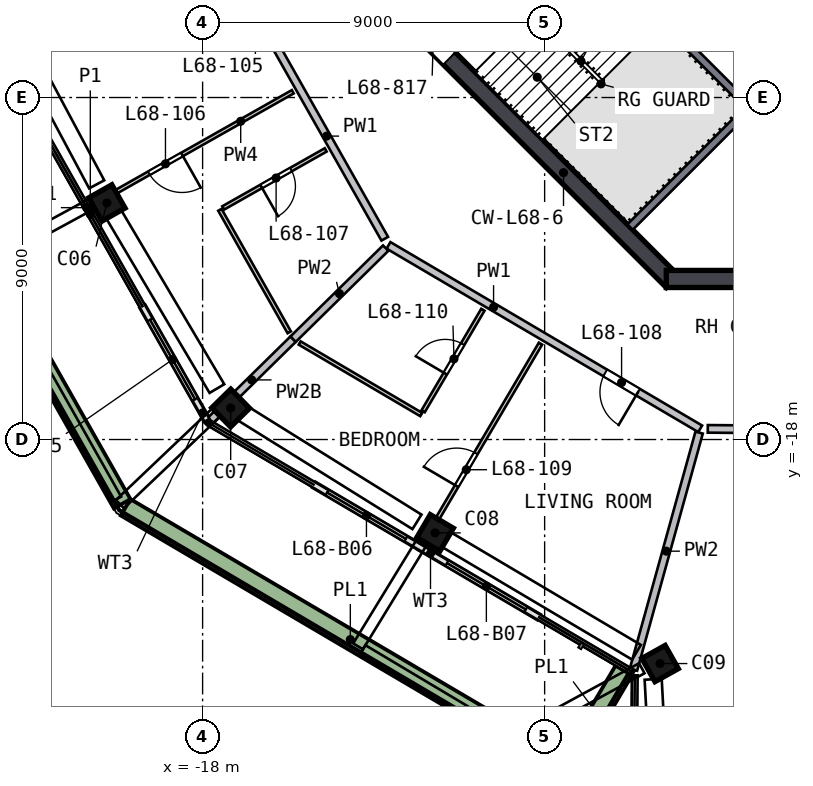
"""IFC4 building model, lengths in metres.
Left out: names, types, materials, properties, quantities, classifications, styles, units other than length and angle.
Written with IfcOpenShell. Run it as: python <this file> out.ifc"""

import sys

from ifc_helpers import new_model, si_unit, direction, frame, frame_2d, origin, origin_2d, place, context, subcontext, project, spatial, rectangle, extrude, element, fill, save


model = new_model("IFC4")
c1 = context("Model", 3, precision=1e-05, world=origin(), true_north=direction((0.0, 1.0)))
c2 = subcontext(c1, "Body", "Model", "MODEL_VIEW")
j1 = project(units=[si_unit("LENGTHUNIT", "METRE"), si_unit("PLANEANGLEUNIT", "RADIAN")], contexts=[c1])
p1 = place(None, origin())
s1 = spatial("IfcSite", under=j1, at=p1, CompositionType="ELEMENT")
p2 = place(p1, origin())
s2 = spatial("IfcBuilding", under=s1, at=p2, CompositionType="ELEMENT")
p3 = place(p2, frame((0.0, 0.0, 277.5)))
s3 = spatial("IfcBuildingStorey", under=s2, at=p3, CompositionType="ELEMENT", Elevation=277.5)
p4 = place(p3, frame((-20.587, -11.657, 0.0), z_axis=(0.056275557, -0.097493601, 0.993643829), x_axis=(0.4894198, -0.864752693, -0.112565713)))
e1 = element("IfcColumn", 1, at=p4, inside=s3, PredefinedType="COLUMN", context=c2, shape_type="SweptSolid", body=[
    extrude(rectangle(XDim=0.7, YDim=0.7, at=origin_2d()), origin(), (0.0, 0.0, 1.0), 3.21),
])
p5 = place(p3, frame((-17.36, -17.072, 0.0), z_axis=(0.081797768, -0.081873788, 0.993280327), x_axis=(-0.696037958, 0.708616908, 0.115729164)))
e2 = element("IfcColumn", 2, at=p5, inside=s3, PredefinedType="COLUMN", context=c2, shape_type="SweptSolid", body=[
    extrude(rectangle(XDim=0.7, YDim=0.7, at=origin_2d()), origin(), (0.0, 0.0, 1.0), 3.211),
])
p6 = place(p3, frame((-12.0, -20.389, 0.0), z_axis=(0.097493601, -0.056275557, 0.993643829), x_axis=(0.8563225, -0.504024539, -0.112565713)))
e3 = element("IfcColumn", 3, at=p6, inside=s3, PredefinedType="COLUMN", context=c2, shape_type="SweptSolid", body=[
    extrude(rectangle(XDim=0.7, YDim=0.7, at=origin_2d()), origin(), (0.0, 0.0, 1.0), 3.21),
])
p7 = place(p3, frame((-6.1, -23.862, 0.0), z_axis=(0.113632685, -0.028047131, 0.993126866), x_axis=(-0.485091763, 0.870787363, 0.080095877)))
e4 = element("IfcColumn", 4, at=p7, inside=s3, PredefinedType="COLUMN", context=c2, shape_type="SweptSolid", body=[
    extrude(rectangle(XDim=0.7, YDim=0.7, at=origin_2d()), origin(), (0.0, 0.0, 1.0), 3.212),
])
p8 = place(p3, frame((-13.841, -5.64, 0.0), z_axis=(0.0, 0.0, 1.0), x_axis=(0.707106781, -0.707106781, 0.0)))
e5 = element("IfcWall", 5, at=p8, inside=s3, PredefinedType="SHEAR", context=c2, shape_type="SweptSolid", body=[
    extrude(rectangle(XDim=11.598, YDim=0.45, at=frame_2d((5.799, 0.0))), origin(), (0.0, 0.0, 1.0), 3.5),
])
p9 = place(p8, frame((2.099, 0.0, 0.0)))
e6 = element("IfcOpeningElement", 6, at=p9, cuts=e5, PredefinedType="OPENING", context=c2, shape_type="SweptSolid", body=[
    extrude(rectangle(XDim=1.2, YDim=2.1, at=frame_2d((0.6, 1.05))), frame((0.0, 0.235, 0.0), z_axis=(0.0, -1.0, 0.0), x_axis=(1.0, 0.0, 0.0)), (0.0, 0.0, 1.0), 0.47),
])
p10 = place(p3, frame((-5.799, -13.775, 0.0), z_axis=(0.0, 0.0, 1.0), x_axis=(1.0, 0.0, 0.0)))
e7 = element("IfcWall", 7, at=p10, inside=s3, PredefinedType="SHEAR", context=c2, shape_type="SweptSolid", body=[
    extrude(rectangle(XDim=11.598, YDim=0.45, at=frame_2d((5.799, 0.0))), origin(), (0.0, 0.0, 1.0), 3.5),
])
p11 = place(p3, frame((-19.579, -14.503, 0.0), z_axis=(0.0, 0.0, 1.0), x_axis=(0.492728526, -0.870183084, 0.0)))
e8 = element("IfcWall", 8, at=p11, inside=s3, PredefinedType="SOLIDWALL", context=c2, shape_type="SweptSolid", body=[
    extrude(rectangle(XDim=3.427, YDim=0.15, at=frame_2d((1.713, 0.0))), origin(), (0.0, 0.0, 1.0), 2.525),
])
p12 = place(p11, frame((0.4, 0.0, 0.0)))
e9 = element("IfcOpeningElement", 9, at=p12, cuts=e8, PredefinedType="OPENING", context=c2, shape_type="SweptSolid", body=[
    extrude(rectangle(XDim=2.4, YDim=2.4, at=frame_2d((1.2, 1.2))), frame((0.0, 0.085, 0.0), z_axis=(0.0, -1.0, 0.0), x_axis=(1.0, 0.0, 0.0)), (0.0, 0.0, 1.0), 0.17),
])
p13 = place(p3, frame((-15.068, -19.193, 0.0), z_axis=(0.0, 0.0, 1.0), x_axis=(0.86182992, -0.507197387, 0.0)))
e10 = element("IfcWall", 10, at=p13, inside=s3, PredefinedType="SOLIDWALL", context=c2, shape_type="SweptSolid", body=[
    extrude(rectangle(XDim=3.25, YDim=0.15, at=frame_2d((1.625, 0.0))), origin(), (0.0, 0.0, 1.0), 2.525),
])
p14 = place(p13, frame((0.4, 0.0, 0.0)))
e11 = element("IfcOpeningElement", 11, at=p14, cuts=e10, PredefinedType="OPENING", context=c2, shape_type="SweptSolid", body=[
    extrude(rectangle(XDim=2.4, YDim=2.4, at=frame_2d((1.2, 1.2))), frame((0.0, 0.085, 0.0), z_axis=(0.0, -1.0, 0.0), x_axis=(1.0, 0.0, 0.0)), (0.0, 0.0, 1.0), 0.17),
])
p15 = place(p3, frame((-12.267, -20.841, 0.0), z_axis=(0.0, 0.0, 1.0), x_axis=(0.861793405, -0.507259427, 0.0)))
e12 = element("IfcWall", 12, at=p15, inside=s3, PredefinedType="SOLIDWALL", context=c2, shape_type="SweptSolid", body=[
    extrude(rectangle(XDim=3.611, YDim=0.15, at=frame_2d((1.806, 0.0))), origin(), (0.0, 0.0, 1.0), 2.525),
])
p16 = place(p15, frame((0.811, 0.0, 0.0)))
e13 = element("IfcOpeningElement", 13, at=p16, cuts=e12, PredefinedType="OPENING", context=c2, shape_type="SweptSolid", body=[
    extrude(rectangle(XDim=2.4, YDim=2.4, at=frame_2d((1.2, 1.2))), frame((0.0, 0.085, 0.0), z_axis=(0.0, -1.0, 0.0), x_axis=(1.0, 0.0, 0.0)), (0.0, 0.0, 1.0), 0.17),
])
p17 = place(p3, frame((-26.633, -8.185, 0.0), z_axis=(0.0, 0.0, 1.0), x_axis=(0.492731181, -0.870181581, 0.0)))
e14 = element("IfcWall", 14, at=p17, inside=s3, PredefinedType="SOLIDWALL", context=c2, shape_type="SweptSolid", body=[
    extrude(rectangle(XDim=13.223, YDim=0.5, at=frame_2d((6.612, 0.0))), origin(), (0.0, 0.0, 1.0), 0.7),
])
p18 = place(p3, frame((-20.026, -19.784, 0.0), z_axis=(0.0, 0.0, 1.0), x_axis=(0.861801103, -0.507246349, 0.0)))
e15 = element("IfcWall", 15, at=p18, inside=s3, PredefinedType="SOLIDWALL", context=c2, shape_type="SweptSolid", body=[
    extrude(rectangle(XDim=13.723, YDim=0.5, at=frame_2d((6.862, 0.0))), origin(), (0.0, 0.0, 1.0), 0.7),
])
p19 = place(p3, frame((-8.288, -26.403, 0.0), z_axis=(0.0, 0.0, 1.0), x_axis=(0.507281009, 0.861780702, 0.0)))
e16 = element("IfcWall", 16, at=p19, inside=s3, PredefinedType="SOLIDWALL", context=c2, shape_type="SweptSolid", body=[
    extrude(rectangle(XDim=2.699, YDim=0.5, at=frame_2d((1.35, 0.0))), origin(), (0.0, 0.0, 1.0), 0.7),
])
p20 = place(p3, frame((-3.535, -9.334, 0.0), z_axis=(0.0, 0.0, 1.0), x_axis=(-0.707120946, 0.707092617, 0.0)))
e17 = element("IfcWall", 17, at=p20, inside=s3, PredefinedType="SOLIDWALL", context=c2, shape_type="SweptSolid", body=[
    extrude(rectangle(XDim=8.618, YDim=0.2, at=frame_2d((4.309, 0.0))), origin(), (0.0, 0.0, 1.0), 3.19),
])
p21 = place(p20, frame((6.6, 0.0, 0.0)))
e18 = element("IfcOpeningElement", 18, at=p21, cuts=e17, PredefinedType="OPENING", context=c2, shape_type="SweptSolid", body=[
    extrude(rectangle(XDim=1.2, YDim=2.1, at=frame_2d((0.6, 1.05))), frame((0.0, 0.11, 0.0), z_axis=(0.0, -1.0, 0.0), x_axis=(1.0, 0.0, 0.0)), (0.0, 0.0, 1.0), 0.22),
])
p22 = place(p3, frame((-3.677, -9.334, 0.0), z_axis=(0.0, 0.0, 1.0), x_axis=(-0.707106781, -0.707106781, 0.0)))
e19 = element("IfcWall", 19, at=p22, inside=s3, PredefinedType="SOLIDWALL", context=c2, shape_type="SweptSolid", body=[
    extrude(rectangle(XDim=4.35, YDim=0.2, at=frame_2d((2.175, 0.0))), origin(), (0.0, 0.0, 1.0), 3.19),
])
p23 = place(p3, frame((-13.207, -12.717, 0.0), z_axis=(0.0, 0.0, 1.0), x_axis=(-0.492724884, 0.870185146, 0.0)))
e20 = element("IfcWall", 20, at=p23, inside=s3, PredefinedType="SOLIDWALL", context=c2, shape_type="SweptSolid", body=[
    extrude(rectangle(XDim=9.336, YDim=0.2, at=frame_2d((4.668, 0.0))), origin(), (0.0, 0.0, 1.0), 3.19),
])
p24 = place(p23, frame((6.408, 0.0, 0.0)))
e21 = element("IfcOpeningElement", 21, at=p24, cuts=e20, PredefinedType="OPENING", context=c2, shape_type="SweptSolid", body=[
    extrude(rectangle(XDim=1.0, YDim=2.1, at=frame_2d((0.5, 1.05))), frame((0.0, 0.11, 0.0), z_axis=(0.0, -1.0, 0.0), x_axis=(1.0, 0.0, 0.0)), (0.0, 0.0, 1.0), 0.22),
])
p25 = place(p3, frame((-4.907, -17.718, 0.0), z_axis=(0.0, 0.0, 1.0), x_axis=(-0.861806246, 0.507237612, 0.0)))
e22 = element("IfcWall", 22, at=p25, inside=s3, PredefinedType="SOLIDWALL", context=c2, shape_type="SweptSolid", body=[
    extrude(rectangle(XDim=9.517, YDim=0.2, at=frame_2d((4.758, 0.0))), origin(), (0.0, 0.0, 1.0), 3.19),
])
p26 = place(p25, frame((1.9, 0.0, 0.0)))
e23 = element("IfcOpeningElement", 23, at=p26, cuts=e22, PredefinedType="OPENING", context=c2, shape_type="SweptSolid", body=[
    extrude(rectangle(XDim=1.0, YDim=2.1, at=frame_2d((0.5, 1.05))), frame((0.0, 0.11, 0.0), z_axis=(0.0, -1.0, 0.0), x_axis=(1.0, 0.0, 0.0)), (0.0, 0.0, 1.0), 0.22),
])
p27 = place(p3, frame((4.609, -17.798, 0.0), z_axis=(0.0, 0.0, 1.0), x_axis=(-0.99996484, 0.008385669, 0.0)))
e24 = element("IfcWall", 24, at=p27, inside=s3, PredefinedType="SOLIDWALL", context=c2, shape_type="SweptSolid", body=[
    extrude(rectangle(XDim=9.316, YDim=0.2, at=frame_2d((4.658, 0.0))), origin(), (0.0, 0.0, 1.0), 3.19),
])
p28 = place(p27, frame((3.84, 0.0, 0.0)))
e25 = element("IfcOpeningElement", 25, at=p28, cuts=e24, PredefinedType="OPENING", context=c2, shape_type="SweptSolid", body=[
    extrude(rectangle(XDim=1.8, YDim=2.1, at=frame_2d((0.9, 1.05))), frame((0.0, 0.11, 0.0), z_axis=(0.0, -1.0, 0.0), x_axis=(1.0, 0.0, 0.0)), (0.0, 0.0, 1.0), 0.22),
])
p29 = place(p3, frame((-15.618, -15.359, 0.0), z_axis=(0.0, 0.0, 1.0), x_axis=(-0.71298711, -0.701177139, 0.0)))
e26 = element("IfcWall", 26, at=p29, inside=s3, PredefinedType="SOLIDWALL", context=c2, shape_type="SweptSolid", body=[
    extrude(rectangle(XDim=3.06, YDim=0.2, at=frame_2d((1.53, 0.0))), origin(), (0.0, 0.0, 1.0), 2.69),
])
p30 = place(p3, frame((-13.182, -12.963, 0.0), z_axis=(0.0, 0.0, 1.0), x_axis=(-0.71297783, -0.701186576, 0.0)))
e27 = element("IfcWall", 27, at=p30, inside=s3, PredefinedType="SOLIDWALL", context=c2, shape_type="SweptSolid", body=[
    extrude(rectangle(XDim=3.416, YDim=0.2, at=frame_2d((1.708, 0.0))), origin(), (0.0, 0.0, 1.0), 3.19),
])
p31 = place(p3, frame((-6.663, -24.059, 0.0), z_axis=(0.0, 0.0, 1.0), x_axis=(0.266914636, 0.963720176, 0.0)))
e28 = element("IfcWall", 28, at=p31, inside=s3, PredefinedType="SOLIDWALL", context=c2, shape_type="SweptSolid", body=[
    extrude(rectangle(XDim=6.476, YDim=0.2, at=frame_2d((3.238, 0.0))), origin(), (0.0, 0.0, 1.0), 3.19),
])
p32 = place(p3, frame((-15.627, -8.849, 0.0), z_axis=(0.0, 0.0, 1.0), x_axis=(-0.870190704, -0.492715069, 0.0)))
e29 = element("IfcWall", 29, at=p32, inside=s3, PredefinedType="PARTITIONING", context=c2, shape_type="SweptSolid", body=[
    extrude(rectangle(XDim=6.15, YDim=0.1, at=frame_2d((3.075, 0.0))), origin(), (0.0, 0.0, 1.0), 3.19),
])
p33 = place(p32, frame((3.35, 0.0, 0.0)))
e30 = element("IfcOpeningElement", 30, at=p33, cuts=e29, PredefinedType="OPENING", context=c2, shape_type="SweptSolid", body=[
    extrude(rectangle(XDim=1.0, YDim=2.1, at=frame_2d((0.5, 1.05))), frame((0.0, 0.06, 0.0), z_axis=(0.0, -1.0, 0.0), x_axis=(1.0, 0.0, 0.0)), (0.0, 0.0, 1.0), 0.12),
])
p34 = place(p3, frame((-17.545, -11.955, 0.0), z_axis=(0.0, 0.0, 1.0), x_axis=(0.492756443, -0.870167276, 0.0)))
e31 = element("IfcWall", 31, at=p34, inside=s3, PredefinedType="PARTITIONING", context=c2, shape_type="SweptSolid", body=[
    extrude(rectangle(XDim=3.704, YDim=0.1, at=frame_2d((1.852, 0.0))), origin(), (0.0, 0.0, 1.0), 3.19),
])
p35 = place(p3, frame((-14.761, -10.379, 0.0), z_axis=(0.0, 0.0, 1.0), x_axis=(-0.870194419, -0.492708506, 0.0)))
e32 = element("IfcWall", 32, at=p35, inside=s3, PredefinedType="PARTITIONING", context=c2, shape_type="SweptSolid", body=[
    extrude(rectangle(XDim=3.1, YDim=0.1, at=frame_2d((1.55, 0.0))), origin(), (0.0, 0.0, 1.0), 3.19),
])
p36 = place(p35, frame((1.05, 0.0, 0.0)))
e33 = element("IfcOpeningElement", 33, at=p36, cuts=e32, PredefinedType="OPENING", context=c2, shape_type="SweptSolid", body=[
    extrude(rectangle(XDim=0.9, YDim=2.1, at=frame_2d((0.45, 1.05))), frame((0.0, 0.06, 0.0), z_axis=(0.0, -1.0, 0.0), x_axis=(1.0, 0.0, 0.0)), (0.0, 0.0, 1.0), 0.12),
])
p37 = place(p3, frame((-15.446, -15.46, 0.0), z_axis=(0.0, 0.0, 1.0), x_axis=(0.861815808, -0.507221365, 0.0)))
e34 = element("IfcWall", 34, at=p37, inside=s3, PredefinedType="PARTITIONING", context=c2, shape_type="SweptSolid", body=[
    extrude(rectangle(XDim=3.711, YDim=0.1, at=frame_2d((1.855, 0.0))), origin(), (0.0, 0.0, 1.0), 3.19),
])
p38 = place(p3, frame((-12.197, -17.256, 0.0), z_axis=(0.0, 0.0, 1.0), x_axis=(0.5072507, 0.861798542, 0.0)))
e35 = element("IfcWall", 35, at=p38, inside=s3, PredefinedType="PARTITIONING", context=c2, shape_type="SweptSolid", body=[
    extrude(rectangle(XDim=3.1, YDim=0.1, at=frame_2d((1.55, 0.0))), origin(), (0.0, 0.0, 1.0), 3.19),
])
p39 = place(p38, frame((1.15, 0.0, 0.0)))
e36 = element("IfcOpeningElement", 36, at=p39, cuts=e35, PredefinedType="OPENING", context=c2, shape_type="SweptSolid", body=[
    extrude(rectangle(XDim=0.9, YDim=2.1, at=frame_2d((0.45, 1.05))), frame((0.0, 0.06, 0.0), z_axis=(0.0, -1.0, 0.0), x_axis=(1.0, 0.0, 0.0)), (0.0, 0.0, 1.0), 0.12),
])
p40 = place(p3, frame((-12.229, -20.777, 0.0), z_axis=(0.0, 0.0, 1.0), x_axis=(0.507256048, 0.861795394, 0.0)))
e37 = element("IfcWall", 37, at=p40, inside=s3, PredefinedType="PARTITIONING", context=c2, shape_type="SweptSolid", body=[
    extrude(rectangle(XDim=6.15, YDim=0.1, at=frame_2d((3.075, 0.0))), origin(), (0.0, 0.0, 1.0), 3.19),
])
p41 = place(p40, frame((1.8, 0.0, 0.0)))
e38 = element("IfcOpeningElement", 38, at=p41, cuts=e37, PredefinedType="OPENING", context=c2, shape_type="SweptSolid", body=[
    extrude(rectangle(XDim=1.0, YDim=2.1, at=frame_2d((0.5, 1.05))), frame((0.0, 0.06, 0.0), z_axis=(0.0, -1.0, 0.0), x_axis=(1.0, 0.0, 0.0)), (0.0, 0.0, 1.0), 0.12),
])
p42 = place(p12, origin())
e39 = element("IfcDoor", 39, at=p42, inside=s3, OperationType="SLIDING_TO_RIGHT", PredefinedType="DOOR", context=c2, shape_type="SweptSolid", body=[
    extrude(rectangle(XDim=2.4, YDim=2.4, at=frame_2d((1.2, 1.2))), frame((0.0, 0.025, 0.0), z_axis=(0.0, -1.0, 0.0), x_axis=(1.0, 0.0, 0.0)), (0.0, 0.0, 1.0), 0.05),
])
fill(e9, e39)
p43 = place(p14, origin())
e40 = element("IfcDoor", 40, at=p43, inside=s3, OperationType="SLIDING_TO_RIGHT", PredefinedType="DOOR", context=c2, shape_type="SweptSolid", body=[
    extrude(rectangle(XDim=2.4, YDim=2.4, at=frame_2d((1.2, 1.2))), frame((0.0, 0.025, 0.0), z_axis=(0.0, -1.0, 0.0), x_axis=(1.0, 0.0, 0.0)), (0.0, 0.0, 1.0), 0.05),
])
fill(e11, e40)
p44 = place(p16, origin())
e41 = element("IfcDoor", 41, at=p44, inside=s3, OperationType="SLIDING_TO_LEFT", PredefinedType="DOOR", context=c2, shape_type="SweptSolid", body=[
    extrude(rectangle(XDim=2.4, YDim=2.4, at=frame_2d((1.2, 1.2))), frame((0.0, 0.025, 0.0), z_axis=(0.0, -1.0, 0.0), x_axis=(1.0, 0.0, 0.0)), (0.0, 0.0, 1.0), 0.05),
])
fill(e13, e41)
p45 = place(p9, origin())
e42 = element("IfcDoor", 42, at=p45, inside=s3, OperationType="SINGLE_SWING_LEFT", PredefinedType="DOOR", context=c2, shape_type="SweptSolid", body=[
    extrude(rectangle(XDim=1.2, YDim=2.1, at=frame_2d((0.6, 1.05))), frame((0.0, 0.025, 0.0), z_axis=(0.0, -1.0, 0.0), x_axis=(1.0, 0.0, 0.0)), (0.0, 0.0, 1.0), 0.05),
])
fill(e6, e42)
p46 = place(p33, origin())
e43 = element("IfcDoor", 43, at=p46, inside=s3, OperationType="SINGLE_SWING_LEFT", PredefinedType="DOOR", context=c2, shape_type="SweptSolid", body=[
    extrude(rectangle(XDim=1.0, YDim=2.1, at=frame_2d((0.5, 1.05))), frame((0.0, 0.025, 0.0), z_axis=(0.0, -1.0, 0.0), x_axis=(1.0, 0.0, 0.0)), (0.0, 0.0, 1.0), 0.05),
])
fill(e30, e43)
p47 = place(p36, origin())
e44 = element("IfcDoor", 44, at=p47, inside=s3, OperationType="SINGLE_SWING_RIGHT", PredefinedType="DOOR", context=c2, shape_type="SweptSolid", body=[
    extrude(rectangle(XDim=0.9, YDim=2.1, at=frame_2d((0.45, 1.05))), frame((0.0, 0.025, 0.0), z_axis=(0.0, -1.0, 0.0), x_axis=(1.0, 0.0, 0.0)), (0.0, 0.0, 1.0), 0.05),
])
fill(e33, e44)
p48 = place(p26, origin())
e45 = element("IfcDoor", 45, at=p48, inside=s3, OperationType="SINGLE_SWING_LEFT", PredefinedType="DOOR", context=c2, shape_type="SweptSolid", body=[
    extrude(rectangle(XDim=1.0, YDim=2.1, at=frame_2d((0.5, 1.05))), frame((0.0, 0.025, 0.0), z_axis=(0.0, -1.0, 0.0), x_axis=(1.0, 0.0, 0.0)), (0.0, 0.0, 1.0), 0.05),
])
fill(e23, e45)
p49 = place(p41, origin())
e46 = element("IfcDoor", 46, at=p49, inside=s3, OperationType="SINGLE_SWING_LEFT", PredefinedType="DOOR", context=c2, shape_type="SweptSolid", body=[
    extrude(rectangle(XDim=1.0, YDim=2.1, at=frame_2d((0.5, 1.05))), frame((0.0, 0.025, 0.0), z_axis=(0.0, -1.0, 0.0), x_axis=(1.0, 0.0, 0.0)), (0.0, 0.0, 1.0), 0.05),
])
fill(e38, e46)
p50 = place(p39, origin())
e47 = element("IfcDoor", 47, at=p50, inside=s3, OperationType="SINGLE_SWING_LEFT", PredefinedType="DOOR", context=c2, shape_type="SweptSolid", body=[
    extrude(rectangle(XDim=0.9, YDim=2.1, at=frame_2d((0.45, 1.05))), frame((0.0, 0.025, 0.0), z_axis=(0.0, -1.0, 0.0), x_axis=(1.0, 0.0, 0.0)), (0.0, 0.0, 1.0), 0.05),
])
fill(e36, e47)
save(model, sys.argv[1])
